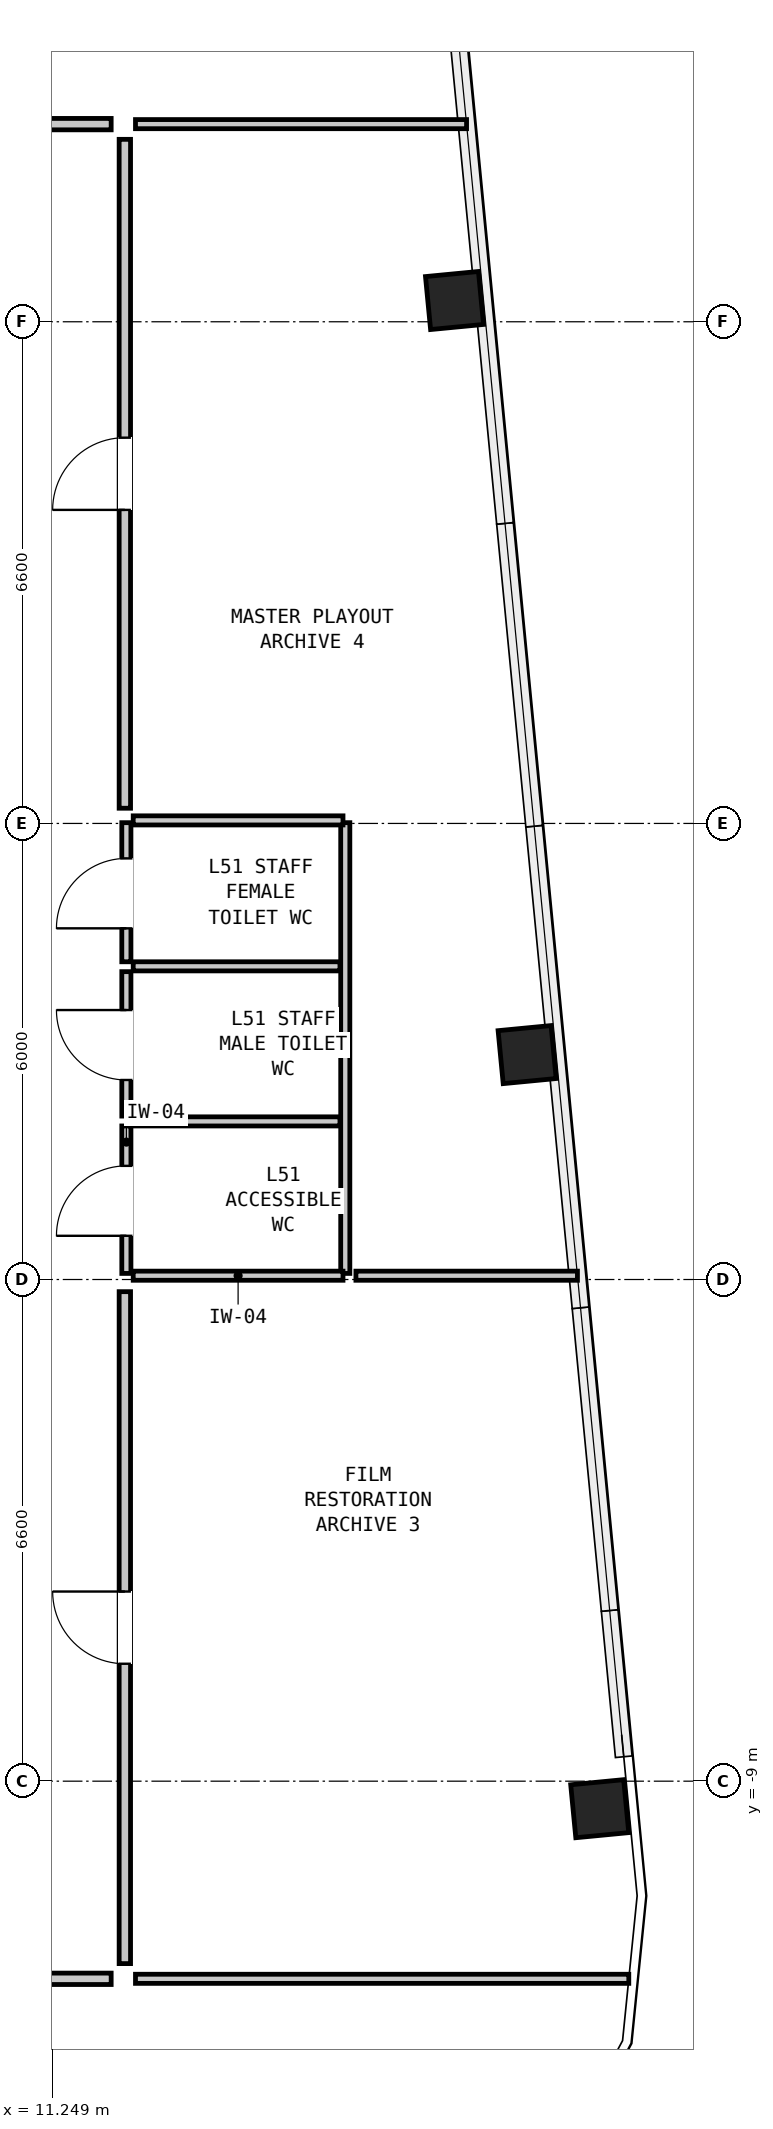
"""IFC4 building model, lengths in metres.
Left out: names, types, materials, properties, quantities, classifications, styles, units other than length and angle.
Written with IfcOpenShell. Run it as: python <this file> out.ifc"""

import sys

from ifc_helpers import new_model, si_unit, direction, frame, frame_2d, origin, origin_2d, place, context, subcontext, project, spatial, rectangle, hollow_rectangle, extrude, element, fill, save


model = new_model("IFC4")
c1 = context("Model", 3, precision=1e-05, world=origin(), true_north=direction((0.0, 1.0)))
c2 = subcontext(c1, "Body", "Model", "MODEL_VIEW")
j1 = project(units=[si_unit("LENGTHUNIT", "METRE"), si_unit("PLANEANGLEUNIT", "RADIAN")], contexts=[c1])
p1 = place(None, origin())
s1 = spatial("IfcSite", under=j1, at=p1, CompositionType="ELEMENT")
p2 = place(p1, origin())
s2 = spatial("IfcBuilding", under=s1, at=p2, CompositionType="ELEMENT")
p3 = place(p2, frame((0.0, 0.0, 174.45)))
s3 = spatial("IfcBuildingStorey", under=s2, at=p3, CompositionType="ELEMENT", Elevation=174.45)
for number, where, z_axis, x_axis in (
    (1, (18.448, -9.362, 0.0), (0.0, 0.0, 1.0), (-0.096, 0.995, 0.0)),
    (2, (17.493, 0.559, 0.0), (0.0, 0.0, 1.0), (-0.096, 0.995, 0.0)),
    (3, (16.537, 10.479, 0.0), (0.0, 0.0, 1.0), (-0.096, 0.995, 0.0)),
):
    element("IfcColumn", number, at=place(p3, frame(where, z_axis=z_axis, x_axis=x_axis)), inside=s3, PredefinedType="COLUMN", context=c2, shape_type="SweptSolid", body=[
        extrude(hollow_rectangle(XDim=0.7, YDim=0.7, WallThickness=0.045, at=origin_2d()), origin(), (0.0, 0.0, 1.0), 3.05),
    ])
p4 = place(p3, frame((12.22, -2.32, 0.0), z_axis=(0.0, 0.0, 1.0), x_axis=(0.0, 1.0, 0.0)))
e4 = element("IfcWall", 4, at=p4, inside=s3, PredefinedType="PARTITIONING", context=c2, shape_type="SweptSolid", body=[
    extrude(rectangle(XDim=1.94, YDim=0.12, at=frame_2d((0.97, 0.0))), origin(), (0.0, 0.0, 1.0), 2.83),
])
p5 = place(p4, frame((0.495, 0.0, 0.0)))
e5 = element("IfcOpeningElement", 5, at=p5, cuts=e4, PredefinedType="OPENING", context=c2, shape_type="SweptSolid", body=[
    extrude(rectangle(XDim=0.92, YDim=2.1, at=frame_2d((0.46, 1.05))), frame((0.0, 0.072, 0.0), z_axis=(0.0, -1.0, 0.0), x_axis=(1.0, 0.0, 0.0)), (0.0, 0.0, 1.0), 0.144),
])
p6 = place(p3, frame((12.22, -0.25, 0.0), z_axis=(0.0, 0.0, 1.0), x_axis=(0.0, 1.0, 0.0)))
e6 = element("IfcWall", 6, at=p6, inside=s3, PredefinedType="PARTITIONING", context=c2, shape_type="SweptSolid", body=[
    extrude(rectangle(XDim=1.9, YDim=0.12, at=frame_2d((0.95, 0.0))), origin(), (0.0, 0.0, 1.0), 2.83),
])
p7 = place(p6, frame((0.475, 0.0, 0.0)))
e7 = element("IfcOpeningElement", 7, at=p7, cuts=e6, PredefinedType="OPENING", context=c2, shape_type="SweptSolid", body=[
    extrude(rectangle(XDim=0.92, YDim=2.1, at=frame_2d((0.46, 1.05))), frame((0.0, 0.072, 0.0), z_axis=(0.0, -1.0, 0.0), x_axis=(1.0, 0.0, 0.0)), (0.0, 0.0, 1.0), 0.144),
])
p8 = place(p3, frame((12.22, 1.78, 0.0), z_axis=(0.0, 0.0, 1.0), x_axis=(0.0, 1.0, 0.0)))
e8 = element("IfcWall", 8, at=p8, inside=s3, PredefinedType="PARTITIONING", context=c2, shape_type="SweptSolid", body=[
    extrude(rectangle(XDim=1.83, YDim=0.12, at=frame_2d((0.915, 0.0))), origin(), (0.0, 0.0, 1.0), 2.83),
])
p9 = place(p8, frame((0.44, 0.0, 0.0)))
e9 = element("IfcOpeningElement", 9, at=p9, cuts=e8, PredefinedType="OPENING", context=c2, shape_type="SweptSolid", body=[
    extrude(rectangle(XDim=0.92, YDim=2.1, at=frame_2d((0.46, 1.05))), frame((0.0, 0.072, 0.0), z_axis=(0.0, -1.0, 0.0), x_axis=(1.0, 0.0, 0.0)), (0.0, 0.0, 1.0), 0.144),
])
p10 = place(p3, frame((15.1, -2.32, 0.0), z_axis=(0.0, 0.0, 1.0), x_axis=(0.0, 1.0, 0.0)))
e10 = element("IfcWall", 10, at=p10, inside=s3, PredefinedType="PARTITIONING", context=c2, shape_type="SweptSolid", body=[
    extrude(rectangle(XDim=5.93, YDim=0.12, at=frame_2d((2.965, 0.0))), origin(), (0.0, 0.0, 1.0), 2.83),
])
for number, where, z_axis, x_axis in (
    (11, (12.31, -2.35, 0.0), (0.0, 0.0, 1.0), (1.0, 0.0, 0.0)),
    (12, (12.31, 3.64, 0.0), (0.0, 0.0, 1.0), (1.0, 0.0, 0.0)),
):
    element("IfcWall", number, at=place(p3, frame(where, z_axis=z_axis, x_axis=x_axis)), inside=s3, PredefinedType="PARTITIONING", context=c2, shape_type="SweptSolid", body=[
        extrude(rectangle(XDim=2.76, YDim=0.12, at=frame_2d((1.38, 0.0))), origin(), (0.0, 0.0, 1.0), 1.883),
    ])
for number, where, z_axis, x_axis in (
    (13, (12.31, -0.32, 0.0), (0.0, 0.0, 1.0), (1.0, 0.0, 0.0)),
    (14, (12.31, 1.72, 0.0), (0.0, 0.0, 1.0), (1.0, 0.0, 0.0)),
):
    element("IfcWall", number, at=place(p3, frame(where, z_axis=z_axis, x_axis=x_axis)), inside=s3, PredefinedType="PARTITIONING", context=c2, shape_type="SweptSolid", body=[
        extrude(rectangle(XDim=2.72, YDim=0.12, at=frame_2d((1.36, 0.0))), origin(), (0.0, 0.0, 1.0), 2.83),
    ])
p11 = place(p3, frame((12.34, 12.8, 0.0), z_axis=(0.0, 0.0, 1.0), x_axis=(1.0, 0.0, 0.0)))
e15 = element("IfcWall", 15, at=p11, inside=s3, PredefinedType="PARTITIONING", context=c2, shape_type="SweptSolid", body=[
    extrude(rectangle(XDim=4.355, YDim=0.12, at=frame_2d((2.178, 0.0))), origin(), (0.0, 0.0, 1.0), 2.83),
])
p12 = place(p3, frame((12.34, -11.6, 0.0), z_axis=(0.0, 0.0, 1.0), x_axis=(1.0, 0.0, 0.0)))
e16 = element("IfcWall", 16, at=p12, inside=s3, PredefinedType="PARTITIONING", context=c2, shape_type="SweptSolid", body=[
    extrude(rectangle(XDim=6.49, YDim=0.12, at=frame_2d((3.245, 0.0))), origin(), (0.0, 0.0, 1.0), 2.347),
])
p13 = place(p3, frame((15.24, -2.35, 0.0), z_axis=(0.0, 0.0, 1.0), x_axis=(1.0, 0.0, 0.0)))
e17 = element("IfcWall", 17, at=p13, inside=s3, PredefinedType="PARTITIONING", context=c2, shape_type="SweptSolid", body=[
    extrude(rectangle(XDim=2.914, YDim=0.12, at=frame_2d((1.457, 0.0))), origin(), (0.0, 0.0, 1.0), 1.883),
])
p14 = place(p3, frame((6.68, 12.8, 0.0), z_axis=(0.0, 0.0, 1.0), x_axis=(1.0, 0.0, 0.0)))
e18 = element("IfcWall", 18, at=p14, inside=s3, PredefinedType="PARTITIONING", context=c2, shape_type="SweptSolid", body=[
    extrude(rectangle(XDim=5.34, YDim=0.15, at=frame_2d((2.67, 0.0))), origin(), (0.0, 0.0, 1.0), 2.83),
])
p15 = place(p14, frame((1.395, 0.0, 0.0)))
e19 = element("IfcOpeningElement", 19, at=p15, cuts=e18, PredefinedType="OPENING", context=c2, shape_type="SweptSolid", body=[
    extrude(rectangle(XDim=0.95, YDim=2.1, at=frame_2d((0.475, 1.05))), frame((0.0, 0.087, 0.0), z_axis=(0.0, -1.0, 0.0), x_axis=(1.0, 0.0, 0.0)), (0.0, 0.0, 1.0), 0.174),
])
p16 = place(p3, frame((7.68, -11.6, 0.0), z_axis=(0.0, 0.0, 1.0), x_axis=(1.0, 0.0, 0.0)))
e20 = element("IfcWall", 20, at=p16, inside=s3, PredefinedType="PARTITIONING", context=c2, shape_type="SweptSolid", body=[
    extrude(rectangle(XDim=4.34, YDim=0.15, at=frame_2d((2.17, 0.0))), origin(), (0.0, 0.0, 1.0), 2.347),
])
p17 = place(p16, frame((2.095, 0.0, 0.0)))
e21 = element("IfcOpeningElement", 21, at=p17, cuts=e20, PredefinedType="OPENING", context=c2, shape_type="SweptSolid", body=[
    extrude(rectangle(XDim=0.95, YDim=2.1, at=frame_2d((0.475, 1.05))), frame((0.0, 0.087, 0.0), z_axis=(0.0, -1.0, 0.0), x_axis=(1.0, 0.0, 0.0)), (0.0, 0.0, 1.0), 0.174),
])
p18 = place(p3, frame((12.2, -11.4, 0.0), z_axis=(0.0, 0.0, 1.0), x_axis=(0.0, 1.0, 0.0)))
e22 = element("IfcWall", 22, at=p18, inside=s3, PredefinedType="PARTITIONING", context=c2, shape_type="SweptSolid", body=[
    extrude(rectangle(XDim=8.84, YDim=0.15, at=frame_2d((4.42, 0.0))), origin(), (0.0, 0.0, 1.0), 2.83),
])
p19 = place(p18, frame((3.945, 0.0, 0.0)))
e23 = element("IfcOpeningElement", 23, at=p19, cuts=e22, PredefinedType="OPENING", context=c2, shape_type="SweptSolid", body=[
    extrude(rectangle(XDim=0.95, YDim=2.1, at=frame_2d((0.475, 1.05))), frame((0.0, 0.087, 0.0), z_axis=(0.0, -1.0, 0.0), x_axis=(1.0, 0.0, 0.0)), (0.0, 0.0, 1.0), 0.174),
])
p20 = place(p3, frame((12.2, 3.8, 0.0), z_axis=(0.0, 0.0, 1.0), x_axis=(0.0, 1.0, 0.0)))
e24 = element("IfcWall", 24, at=p20, inside=s3, PredefinedType="PARTITIONING", context=c2, shape_type="SweptSolid", body=[
    extrude(rectangle(XDim=8.8, YDim=0.15, at=frame_2d((4.4, 0.0))), origin(), (0.0, 0.0, 1.0), 2.83),
])
p21 = place(p20, frame((3.925, 0.0, 0.0)))
e25 = element("IfcOpeningElement", 25, at=p21, cuts=e24, PredefinedType="OPENING", context=c2, shape_type="SweptSolid", body=[
    extrude(rectangle(XDim=0.95, YDim=2.1, at=frame_2d((0.475, 1.05))), frame((0.0, 0.087, 0.0), z_axis=(0.0, -1.0, 0.0), x_axis=(1.0, 0.0, 0.0)), (0.0, 0.0, 1.0), 0.174),
])
p22 = place(p5, origin())
e26 = element("IfcDoor", 26, at=p22, inside=s3, OperationType="SINGLE_SWING_LEFT", PredefinedType="DOOR", context=c2, shape_type="SweptSolid", body=[
    extrude(rectangle(XDim=0.92, YDim=2.1, at=frame_2d((0.46, 1.05))), frame((0.0, 0.025, 0.0), z_axis=(0.0, -1.0, 0.0), x_axis=(1.0, 0.0, 0.0)), (0.0, 0.0, 1.0), 0.05),
])
fill(e5, e26)
p23 = place(p7, origin())
e27 = element("IfcDoor", 27, at=p23, inside=s3, OperationType="SINGLE_SWING_RIGHT", PredefinedType="DOOR", context=c2, shape_type="SweptSolid", body=[
    extrude(rectangle(XDim=0.92, YDim=2.1, at=frame_2d((0.46, 1.05))), frame((0.0, 0.025, 0.0), z_axis=(0.0, -1.0, 0.0), x_axis=(1.0, 0.0, 0.0)), (0.0, 0.0, 1.0), 0.05),
])
fill(e7, e27)
p24 = place(p9, origin())
e28 = element("IfcDoor", 28, at=p24, inside=s3, OperationType="SINGLE_SWING_LEFT", PredefinedType="DOOR", context=c2, shape_type="SweptSolid", body=[
    extrude(rectangle(XDim=0.92, YDim=2.1, at=frame_2d((0.46, 1.05))), frame((0.0, 0.025, 0.0), z_axis=(0.0, -1.0, 0.0), x_axis=(1.0, 0.0, 0.0)), (0.0, 0.0, 1.0), 0.05),
])
fill(e9, e28)
p25 = place(p19, origin())
e29 = element("IfcDoor", 29, at=p25, inside=s3, OperationType="SINGLE_SWING_RIGHT", PredefinedType="DOOR", context=c2, shape_type="SweptSolid", body=[
    extrude(rectangle(XDim=0.95, YDim=2.1, at=frame_2d((0.475, 1.05))), frame((0.0, 0.025, 0.0), z_axis=(0.0, -1.0, 0.0), x_axis=(1.0, 0.0, 0.0)), (0.0, 0.0, 1.0), 0.05),
])
fill(e23, e29)
p26 = place(p21, origin())
e30 = element("IfcDoor", 30, at=p26, inside=s3, OperationType="SINGLE_SWING_LEFT", PredefinedType="DOOR", context=c2, shape_type="SweptSolid", body=[
    extrude(rectangle(XDim=0.95, YDim=2.1, at=frame_2d((0.475, 1.05))), frame((0.0, 0.025, 0.0), z_axis=(0.0, -1.0, 0.0), x_axis=(1.0, 0.0, 0.0)), (0.0, 0.0, 1.0), 0.05),
])
fill(e25, e30)
save(model, sys.argv[1])
